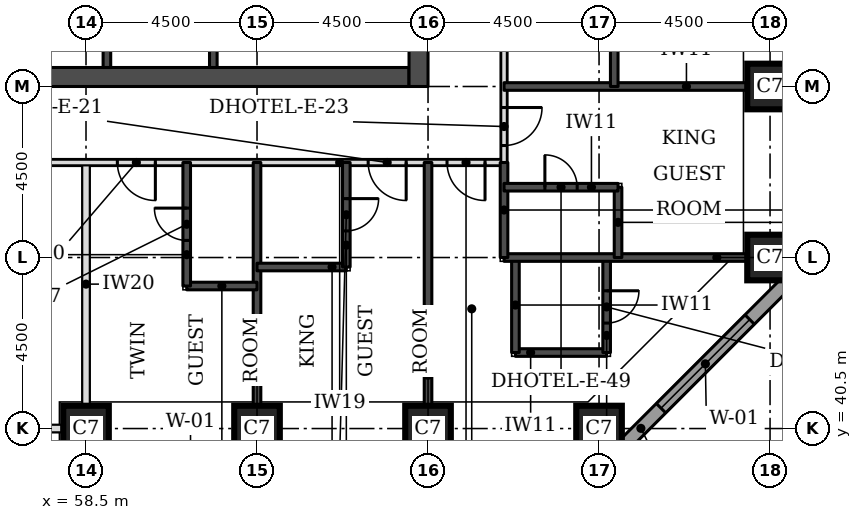
"""IFC4 building model, lengths in metres.
Left out: names, types, materials, properties, quantities, classifications, styles, units other than length and angle.
Written with IfcOpenShell. Run it as: python <this file> out.ifc"""

import sys

from ifc_helpers import new_model, si_unit, direction, frame, frame_2d, origin, origin_2d, place, context, subcontext, project, spatial, rectangle, extrude, element, fill, save


model = new_model("IFC4")
c1 = context("Model", 3, precision=1e-05, world=origin(), true_north=direction((0.0, 1.0)))
c2 = subcontext(c1, "Body", "Model", "MODEL_VIEW")
j1 = project(units=[si_unit("LENGTHUNIT", "METRE"), si_unit("PLANEANGLEUNIT", "RADIAN")], contexts=[c1])
p1 = place(None, origin())
s1 = spatial("IfcSite", under=j1, at=p1, CompositionType="ELEMENT")
p2 = place(p1, origin())
s2 = spatial("IfcBuilding", under=s1, at=p2, CompositionType="ELEMENT")
p3 = place(p2, frame((0.0, 0.0, 39.6)))
s3 = spatial("IfcBuildingStorey", under=s2, at=p3, CompositionType="ELEMENT", Elevation=39.6)
for number, where, z_axis, x_axis in (
    (1, (58.5, 40.5, 0.0), (0.0, 0.0, 1.0), (1.0, 0.0, 0.0)),
    (2, (63.0, 40.5, 0.0), (0.0, 0.0, 1.0), (1.0, 0.0, 0.0)),
    (3, (67.5, 40.5, 0.0), (0.0, 0.0, 1.0), (1.0, 0.0, 0.0)),
    (4, (72.0, 40.5, 0.0), (0.0, 0.0, 1.0), (1.0, 0.0, 0.0)),
    (5, (76.5, 45.0, 0.0), (0.0, 0.0, 1.0), (1.0, 0.0, 0.0)),
    (6, (76.5, 49.5, 0.0), (0.0, 0.0, 1.0), (1.0, 0.0, 0.0)),
):
    element("IfcColumn", number, at=place(p3, frame(where, z_axis=z_axis, x_axis=x_axis)), inside=s3, PredefinedType="COLUMN", context=c2, shape_type="SweptSolid", body=[
        extrude(rectangle(XDim=1.2, YDim=1.2, at=origin_2d()), origin(), (0.0, 0.0, 1.0), 3.3),
    ])
p4 = place(p3, frame((45.5, 49.75, 0.0), z_axis=(0.0, 0.0, 1.0), x_axis=(1.0, 0.0, 0.0)))
e7 = element("IfcWall", 7, at=p4, inside=s3, PredefinedType="SHEAR", context=c2, shape_type="SweptSolid", body=[
    extrude(rectangle(XDim=21.5, YDim=0.5, at=frame_2d((10.75, 0.0))), origin(), (0.0, 0.0, 1.0), 3.3),
])
p5 = place(p3, frame((67.25, 49.5, 0.0), z_axis=(0.0, 0.0, 1.0), x_axis=(0.0, 1.0, 0.0)))
e8 = element("IfcWall", 8, at=p5, inside=s3, PredefinedType="SHEAR", context=c2, shape_type="SweptSolid", body=[
    extrude(rectangle(XDim=22.5, YDim=0.5, at=frame_2d((11.25, 0.0))), origin(), (0.0, 0.0, 1.0), 3.3),
])
p6 = place(p5, frame((4.2, 0.0, 0.0)))
e9 = element("IfcOpeningElement", 9, at=p6, cuts=e8, PredefinedType="OPENING", context=c2, shape_type="SweptSolid", body=[
    extrude(rectangle(XDim=1.8, YDim=2.1, at=frame_2d((0.9, 1.05))), frame((0.0, 0.26, 0.0), z_axis=(0.0, -1.0, 0.0), x_axis=(1.0, 0.0, 0.0)), (0.0, 0.0, 1.0), 0.52),
])
p7 = place(p5, frame((6.9, 0.0, 0.0)))
e10 = element("IfcOpeningElement", 10, at=p7, cuts=e8, PredefinedType="OPENING", context=c2, shape_type="SweptSolid", body=[
    extrude(rectangle(XDim=1.1, YDim=2.1, at=frame_2d((0.55, 1.05))), frame((0.0, 0.26, 0.0), z_axis=(0.0, -1.0, 0.0), x_axis=(1.0, 0.0, 0.0)), (0.0, 0.0, 1.0), 0.52),
])
p8 = place(p5, frame((13.6, 0.0, 0.0)))
e11 = element("IfcOpeningElement", 11, at=p8, cuts=e8, PredefinedType="OPENING", context=c2, shape_type="SweptSolid", body=[
    extrude(rectangle(XDim=1.1, YDim=2.1, at=frame_2d((0.55, 1.05))), frame((0.0, 0.26, 0.0), z_axis=(0.0, -1.0, 0.0), x_axis=(1.0, 0.0, 0.0)), (0.0, 0.0, 1.0), 0.52),
])
p9 = place(p5, frame((16.5, 0.0, 0.0)))
e12 = element("IfcOpeningElement", 12, at=p9, cuts=e8, PredefinedType="OPENING", context=c2, shape_type="SweptSolid", body=[
    extrude(rectangle(XDim=1.8, YDim=2.1, at=frame_2d((0.9, 1.05))), frame((0.0, 0.26, 0.0), z_axis=(0.0, -1.0, 0.0), x_axis=(1.0, 0.0, 0.0)), (0.0, 0.0, 1.0), 0.52),
])
p10 = place(p3, frame((72.27, 39.674, 0.0), z_axis=(0.0, 0.0, 1.0), x_axis=(0.707106781187, 0.707106781187, 0.0)))
e13 = element("IfcWall", 13, at=p10, inside=s3, PredefinedType="STANDARD", context=c2, shape_type="SweptSolid", body=[
    extrude(rectangle(XDim=7.151, YDim=0.35, at=frame_2d((3.576, 0.0))), origin(), (0.0, 0.0, 1.0), 3.055),
])
p11 = place(p10, frame((1.926, 0.0, 0.8)))
e14 = element("IfcOpeningElement", 14, at=p11, cuts=e13, PredefinedType="OPENING", context=c2, shape_type="SweptSolid", body=[
    extrude(rectangle(XDim=3.3, YDim=1.5, at=frame_2d((1.65, 0.75))), frame((0.0, 0.185, 0.0), z_axis=(0.0, -1.0, 0.0), x_axis=(1.0, 0.0, 0.0)), (0.0, 0.0, 1.0), 0.37),
])
p12 = place(p3, frame((52.85, 40.5, 0.0), z_axis=(0.0, 0.0, 1.0), x_axis=(1.0, 0.0, 0.0)))
e15 = element("IfcWall", 15, at=p12, inside=s3, PredefinedType="PARTITIONING", context=c2, shape_type="SweptSolid", body=[
    extrude(rectangle(XDim=5.05, YDim=0.2, at=frame_2d((2.525, 0.0))), origin(), (0.0, 0.0, 1.0), 2.33),
])
p13 = place(p3, frame((58.5, 41.1, 0.0), z_axis=(0.0, 0.0, 1.0), x_axis=(0.0, 1.0, 0.0)))
e16 = element("IfcWall", 16, at=p13, inside=s3, PredefinedType="PARTITIONING", context=c2, shape_type="SweptSolid", body=[
    extrude(rectangle(XDim=6.4, YDim=0.2, at=frame_2d((3.2, 0.0))), origin(), (0.0, 0.0, 1.0), 3.08),
])
p14 = place(p3, frame((52.85, 47.5, 0.0), z_axis=(0.0, 0.0, 1.0), x_axis=(1.0, 0.0, 0.0)))
e17 = element("IfcWall", 17, at=p14, inside=s3, PredefinedType="PARTITIONING", context=c2, shape_type="SweptSolid", body=[
    extrude(rectangle(XDim=16.65, YDim=0.15, at=frame_2d((8.325, 0.0))), origin(), (0.0, 0.0, 1.0), 3.08),
])
p15 = place(p14, frame((13.075, 0.0, 0.0)))
e18 = element("IfcOpeningElement", 18, at=p15, cuts=e17, PredefinedType="OPENING", context=c2, shape_type="SweptSolid", body=[
    extrude(rectangle(XDim=1.0, YDim=2.1, at=frame_2d((0.5, 1.05))), frame((0.0, 0.085, 0.0), z_axis=(0.0, -1.0, 0.0), x_axis=(1.0, 0.0, 0.0)), (0.0, 0.0, 1.0), 0.17),
])
p16 = place(p14, frame((6.475, 0.0, 0.0)))
e19 = element("IfcOpeningElement", 19, at=p16, cuts=e17, PredefinedType="OPENING", context=c2, shape_type="SweptSolid", body=[
    extrude(rectangle(XDim=1.0, YDim=2.1, at=frame_2d((0.5, 1.05))), frame((0.0, 0.085, 0.0), z_axis=(0.0, -1.0, 0.0), x_axis=(1.0, 0.0, 0.0)), (0.0, 0.0, 1.0), 0.17),
])
p17 = place(p14, frame((15.15, 0.0, 0.0)))
e20 = element("IfcOpeningElement", 20, at=p17, cuts=e17, PredefinedType="OPENING", context=c2, shape_type="SweptSolid", body=[
    extrude(rectangle(XDim=1.0, YDim=2.1, at=frame_2d((0.5, 1.05))), frame((0.0, 0.085, 0.0), z_axis=(0.0, -1.0, 0.0), x_axis=(1.0, 0.0, 0.0)), (0.0, 0.0, 1.0), 0.17),
])
p18 = place(p3, frame((69.5, 47.5, 0.0), z_axis=(0.0, 0.0, 1.0), x_axis=(0.0, 1.0, 0.0)))
e21 = element("IfcWall", 21, at=p18, inside=s3, PredefinedType="PARTITIONING", context=c2, shape_type="SweptSolid", body=[
    extrude(rectangle(XDim=26.5, YDim=0.15, at=frame_2d((13.25, 0.0))), origin(), (0.0, 0.0, 1.0), 3.08),
])
p19 = place(p18, frame((25.053, 0.0, 0.0)))
e22 = element("IfcOpeningElement", 22, at=p19, cuts=e21, PredefinedType="OPENING", context=c2, shape_type="SweptSolid", body=[
    extrude(rectangle(XDim=1.0, YDim=2.1, at=frame_2d((0.5, 1.05))), frame((0.0, 0.085, 0.0), z_axis=(0.0, -1.0, 0.0), x_axis=(1.0, 0.0, 0.0)), (0.0, 0.0, 1.0), 0.17),
])
p20 = place(p18, frame((13.775, 0.0, 0.0)))
e23 = element("IfcOpeningElement", 23, at=p20, cuts=e21, PredefinedType="OPENING", context=c2, shape_type="SweptSolid", body=[
    extrude(rectangle(XDim=1.0, YDim=2.1, at=frame_2d((0.5, 1.05))), frame((0.0, 0.085, 0.0), z_axis=(0.0, -1.0, 0.0), x_axis=(1.0, 0.0, 0.0)), (0.0, 0.0, 1.0), 0.17),
])
p21 = place(p18, frame((7.65, 0.0, 0.0)))
e24 = element("IfcOpeningElement", 24, at=p21, cuts=e21, PredefinedType="OPENING", context=c2, shape_type="SweptSolid", body=[
    extrude(rectangle(XDim=1.1, YDim=2.1, at=frame_2d((0.55, 1.05))), frame((0.0, 0.085, 0.0), z_axis=(0.0, -1.0, 0.0), x_axis=(1.0, 0.0, 0.0)), (0.0, 0.0, 1.0), 0.17),
])
p22 = place(p18, frame((0.447, 0.0, 0.0)))
e25 = element("IfcOpeningElement", 25, at=p22, cuts=e21, PredefinedType="OPENING", context=c2, shape_type="SweptSolid", body=[
    extrude(rectangle(XDim=1.0, YDim=2.1, at=frame_2d((0.5, 1.05))), frame((0.0, 0.085, 0.0), z_axis=(0.0, -1.0, 0.0), x_axis=(1.0, 0.0, 0.0)), (0.0, 0.0, 1.0), 0.17),
])
for number, where, z_axis, x_axis in (
    (26, (63.0, 41.1, 0.0), (0.0, 0.0, 1.0), (0.0, 1.0, 0.0)),
    (27, (67.5, 41.1, 0.0), (0.0, 0.0, 1.0), (0.0, 1.0, 0.0)),
):
    element("IfcWall", number, at=place(p3, frame(where, z_axis=z_axis, x_axis=x_axis)), inside=s3, PredefinedType="SOLIDWALL", context=c2, shape_type="SweptSolid", body=[
        extrude(rectangle(XDim=6.4, YDim=0.2, at=frame_2d((3.2, 0.0))), origin(), (0.0, 0.0, 1.0), 3.08),
    ])
p23 = place(p3, frame((69.8, 42.5, 0.0), z_axis=(0.0, 0.0, 1.0), x_axis=(1.0, 0.0, 0.0)))
e28 = element("IfcWall", 28, at=p23, inside=s3, PredefinedType="SOLIDWALL", context=c2, shape_type="SweptSolid", body=[
    extrude(rectangle(XDim=2.4, YDim=0.2, at=frame_2d((1.2, 0.0))), origin(), (0.0, 0.0, 1.0), 3.08),
])
p24 = place(p3, frame((69.8, 42.5, 0.0), z_axis=(0.0, 0.0, 1.0), x_axis=(0.0, 1.0, 0.0)))
e29 = element("IfcWall", 29, at=p24, inside=s3, PredefinedType="SOLIDWALL", context=c2, shape_type="SweptSolid", body=[
    extrude(rectangle(XDim=2.5, YDim=0.2, at=frame_2d((1.25, 0.0))), origin(), (0.0, 0.0, 1.0), 3.08),
])
p25 = place(p3, frame((72.2, 42.5, 0.0), z_axis=(0.0, 0.0, 1.0), x_axis=(0.0, 1.0, 0.0)))
e30 = element("IfcWall", 30, at=p25, inside=s3, PredefinedType="SOLIDWALL", context=c2, shape_type="SweptSolid", body=[
    extrude(rectangle(XDim=2.5, YDim=0.2, at=frame_2d((1.25, 0.0))), origin(), (0.0, 0.0, 1.0), 3.08),
])
p26 = place(p25, frame((0.775, 0.0, 0.0)))
e31 = element("IfcOpeningElement", 31, at=p26, cuts=e30, PredefinedType="OPENING", context=c2, shape_type="SweptSolid", body=[
    extrude(rectangle(XDim=0.85, YDim=2.1, at=frame_2d((0.425, 1.05))), frame((0.0, 0.11, 0.0), z_axis=(0.0, -1.0, 0.0), x_axis=(1.0, 0.0, 0.0)), (0.0, 0.0, 1.0), 0.22),
])
p27 = place(p3, frame((61.15, 44.25, 0.0), z_axis=(0.0, 0.0, 1.0), x_axis=(1.0, 0.0, 0.0)))
e32 = element("IfcWall", 32, at=p27, inside=s3, PredefinedType="SOLIDWALL", context=c2, shape_type="SweptSolid", body=[
    extrude(rectangle(XDim=1.85, YDim=0.2, at=frame_2d((0.925, 0.0))), origin(), (0.0, 0.0, 1.0), 3.08),
])
p28 = place(p3, frame((61.15, 44.25, 0.0), z_axis=(0.0, 0.0, 1.0), x_axis=(0.0, 1.0, 0.0)))
e33 = element("IfcWall", 33, at=p28, inside=s3, PredefinedType="SOLIDWALL", context=c2, shape_type="SweptSolid", body=[
    extrude(rectangle(XDim=3.25, YDim=0.2, at=frame_2d((1.625, 0.0))), origin(), (0.0, 0.0, 1.0), 3.08),
])
p29 = place(p28, frame((1.2, 0.0, 0.0)))
e34 = element("IfcOpeningElement", 34, at=p29, cuts=e33, PredefinedType="OPENING", context=c2, shape_type="SweptSolid", body=[
    extrude(rectangle(XDim=0.85, YDim=2.1, at=frame_2d((0.425, 1.05))), frame((0.0, 0.11, 0.0), z_axis=(0.0, -1.0, 0.0), x_axis=(1.0, 0.0, 0.0)), (0.0, 0.0, 1.0), 0.22),
])
p30 = place(p3, frame((63.0, 44.75, 0.0), z_axis=(0.0, 0.0, 1.0), x_axis=(1.0, 0.0, 0.0)))
e35 = element("IfcWall", 35, at=p30, inside=s3, PredefinedType="SOLIDWALL", context=c2, shape_type="SweptSolid", body=[
    extrude(rectangle(XDim=2.35, YDim=0.2, at=frame_2d((1.175, 0.0))), origin(), (0.0, 0.0, 1.0), 3.08),
])
p31 = place(p3, frame((65.35, 44.75, 0.0), z_axis=(0.0, 0.0, 1.0), x_axis=(0.0, 1.0, 0.0)))
e36 = element("IfcWall", 36, at=p31, inside=s3, PredefinedType="SOLIDWALL", context=c2, shape_type="SweptSolid", body=[
    extrude(rectangle(XDim=2.75, YDim=0.2, at=frame_2d((1.375, 0.0))), origin(), (0.0, 0.0, 1.0), 3.08),
])
p32 = place(p31, frame((0.95, 0.0, 0.0)))
e37 = element("IfcOpeningElement", 37, at=p32, cuts=e36, PredefinedType="OPENING", context=c2, shape_type="SweptSolid", body=[
    extrude(rectangle(XDim=0.85, YDim=2.1, at=frame_2d((0.425, 1.05))), frame((0.0, 0.11, 0.0), z_axis=(0.0, -1.0, 0.0), x_axis=(1.0, 0.0, 0.0)), (0.0, 0.0, 1.0), 0.22),
])
p33 = place(p3, frame((69.5, 45.0, 0.0), z_axis=(0.0, 0.0, 1.0), x_axis=(1.0, 0.0, 0.0)))
e38 = element("IfcWall", 38, at=p33, inside=s3, PredefinedType="SOLIDWALL", context=c2, shape_type="SweptSolid", body=[
    extrude(rectangle(XDim=6.4, YDim=0.2, at=frame_2d((3.2, 0.0))), origin(), (0.0, 0.0, 1.0), 3.08),
])
p34 = place(p3, frame((69.5, 45.0, 0.0), z_axis=(0.0, 0.0, 1.0), x_axis=(0.0, 1.0, 0.0)))
e39 = element("IfcWall", 39, at=p34, inside=s3, PredefinedType="SOLIDWALL", context=c2, shape_type="SweptSolid", body=[
    extrude(rectangle(XDim=2.5, YDim=0.2, at=frame_2d((1.25, 0.0))), origin(), (0.0, 0.0, 1.0), 3.08),
])
p35 = place(p3, frame((72.5, 45.0, 0.0), z_axis=(0.0, 0.0, 1.0), x_axis=(0.0, 1.0, 0.0)))
e40 = element("IfcWall", 40, at=p35, inside=s3, PredefinedType="SOLIDWALL", context=c2, shape_type="SweptSolid", body=[
    extrude(rectangle(XDim=1.85, YDim=0.2, at=frame_2d((0.925, 0.0))), origin(), (0.0, 0.0, 1.0), 3.08),
])
p36 = place(p3, frame((69.5, 46.85, 0.0), z_axis=(0.0, 0.0, 1.0), x_axis=(1.0, 0.0, 0.0)))
e41 = element("IfcWall", 41, at=p36, inside=s3, PredefinedType="SOLIDWALL", context=c2, shape_type="SweptSolid", body=[
    extrude(rectangle(XDim=3.0, YDim=0.2, at=frame_2d((1.5, 0.0))), origin(), (0.0, 0.0, 1.0), 3.08),
])
p37 = place(p36, frame((1.075, 0.0, 0.0)))
e42 = element("IfcOpeningElement", 42, at=p37, cuts=e41, PredefinedType="OPENING", context=c2, shape_type="SweptSolid", body=[
    extrude(rectangle(XDim=0.85, YDim=2.1, at=frame_2d((0.425, 1.05))), frame((0.0, 0.11, 0.0), z_axis=(0.0, -1.0, 0.0), x_axis=(1.0, 0.0, 0.0)), (0.0, 0.0, 1.0), 0.22),
])
p38 = place(p3, frame((69.5, 49.5, 0.0), z_axis=(0.0, 0.0, 1.0), x_axis=(1.0, 0.0, 0.0)))
e43 = element("IfcWall", 43, at=p38, inside=s3, PredefinedType="SOLIDWALL", context=c2, shape_type="SweptSolid", body=[
    extrude(rectangle(XDim=6.4, YDim=0.2, at=frame_2d((3.2, 0.0))), origin(), (0.0, 0.0, 1.0), 3.08),
])
p39 = place(p3, frame((72.4, 49.5, 0.0), z_axis=(0.0, 0.0, 1.0), x_axis=(0.0, 1.0, 0.0)))
e44 = element("IfcWall", 44, at=p39, inside=s3, PredefinedType="SOLIDWALL", context=c2, shape_type="SweptSolid", body=[
    extrude(rectangle(XDim=3.4, YDim=0.2, at=frame_2d((1.7, 0.0))), origin(), (0.0, 0.0, 1.0), 3.08),
])
for number, where, z_axis, x_axis in (
    (45, (59.05, 50.0, 0.0), (0.0, 0.0, 1.0), (0.0, 1.0, 0.0)),
    (46, (61.85, 50.0, 0.0), (0.0, 0.0, 1.0), (0.0, 1.0, 0.0)),
):
    element("IfcWall", number, at=place(p3, frame(where, z_axis=z_axis, x_axis=x_axis)), inside=s3, PredefinedType="SOLIDWALL", context=c2, shape_type="SweptSolid", body=[
        extrude(rectangle(XDim=3.0, YDim=0.2, at=frame_2d((1.5, 0.0))), origin(), (0.0, 0.0, 1.0), 3.08),
    ])
p40 = place(p11, origin())
e47 = element("IfcWindow", 47, at=p40, inside=s3, PartitioningType="SINGLE_PANEL", PredefinedType="WINDOW", context=c2, shape_type="SweptSolid", body=[
    extrude(rectangle(XDim=3.3, YDim=1.5, at=frame_2d((1.65, 0.75))), frame((0.0, 0.085, 0.0), z_axis=(0.0, -1.0, 0.0), x_axis=(1.0, 0.0, 0.0)), (0.0, 0.0, 1.0), 0.06),
])
fill(e14, e47)
p41 = place(p22, frame((1.0, 0.0, 0.0), z_axis=(0.0, 0.0, 1.0), x_axis=(-1.0, 0.0, 0.0)))
e48 = element("IfcDoor", 48, at=p41, inside=s3, OperationType="SINGLE_SWING_LEFT", PredefinedType="DOOR", context=c2, shape_type="SweptSolid", body=[
    extrude(rectangle(XDim=1.0, YDim=2.1, at=frame_2d((0.5, 1.05))), frame((0.0, 0.025, 0.0), z_axis=(0.0, -1.0, 0.0), x_axis=(1.0, 0.0, 0.0)), (0.0, 0.0, 1.0), 0.05),
])
fill(e25, e48)
p42 = place(p37, origin())
e49 = element("IfcDoor", 49, at=p42, inside=s3, OperationType="SINGLE_SWING_LEFT", PredefinedType="DOOR", context=c2, shape_type="SweptSolid", body=[
    extrude(rectangle(XDim=0.85, YDim=2.1, at=frame_2d((0.425, 1.05))), frame((0.0, 0.025, 0.0), z_axis=(0.0, -1.0, 0.0), x_axis=(1.0, 0.0, 0.0)), (0.0, 0.0, 1.0), 0.05),
])
fill(e42, e49)
p43 = place(p15, frame((1.0, 0.0, 0.0), z_axis=(0.0, 0.0, 1.0), x_axis=(-1.0, 0.0, 0.0)))
e50 = element("IfcDoor", 50, at=p43, inside=s3, OperationType="SINGLE_SWING_LEFT", PredefinedType="DOOR", context=c2, shape_type="SweptSolid", body=[
    extrude(rectangle(XDim=1.0, YDim=2.1, at=frame_2d((0.5, 1.05))), frame((0.0, 0.025, 0.0), z_axis=(0.0, -1.0, 0.0), x_axis=(1.0, 0.0, 0.0)), (0.0, 0.0, 1.0), 0.05),
])
fill(e18, e50)
p44 = place(p32, frame((0.85, 0.0, 0.0), z_axis=(0.0, 0.0, 1.0), x_axis=(-1.0, 0.0, 0.0)))
e51 = element("IfcDoor", 51, at=p44, inside=s3, OperationType="SINGLE_SWING_LEFT", PredefinedType="DOOR", context=c2, shape_type="SweptSolid", body=[
    extrude(rectangle(XDim=0.85, YDim=2.1, at=frame_2d((0.425, 1.05))), frame((0.0, 0.025, 0.0), z_axis=(0.0, -1.0, 0.0), x_axis=(1.0, 0.0, 0.0)), (0.0, 0.0, 1.0), 0.05),
])
fill(e37, e51)
p45 = place(p16, frame((1.0, 0.0, 0.0), z_axis=(0.0, 0.0, 1.0), x_axis=(-1.0, 0.0, 0.0)))
e52 = element("IfcDoor", 52, at=p45, inside=s3, OperationType="SINGLE_SWING_LEFT", PredefinedType="DOOR", context=c2, shape_type="SweptSolid", body=[
    extrude(rectangle(XDim=1.0, YDim=2.1, at=frame_2d((0.5, 1.05))), frame((0.0, 0.025, 0.0), z_axis=(0.0, -1.0, 0.0), x_axis=(1.0, 0.0, 0.0)), (0.0, 0.0, 1.0), 0.05),
])
fill(e19, e52)
p46 = place(p29, origin())
e53 = element("IfcDoor", 53, at=p46, inside=s3, OperationType="SINGLE_SWING_RIGHT", PredefinedType="DOOR", context=c2, shape_type="SweptSolid", body=[
    extrude(rectangle(XDim=0.85, YDim=2.1, at=frame_2d((0.425, 1.05))), frame((0.0, 0.025, 0.0), z_axis=(0.0, -1.0, 0.0), x_axis=(1.0, 0.0, 0.0)), (0.0, 0.0, 1.0), 0.05),
])
fill(e34, e53)
p47 = place(p17, frame((1.0, 0.0, 0.0), z_axis=(0.0, 0.0, 1.0), x_axis=(-1.0, 0.0, 0.0)))
e54 = element("IfcDoor", 54, at=p47, inside=s3, OperationType="SINGLE_SWING_LEFT", PredefinedType="DOOR", context=c2, shape_type="SweptSolid", body=[
    extrude(rectangle(XDim=1.0, YDim=2.1, at=frame_2d((0.5, 1.05))), frame((0.0, 0.025, 0.0), z_axis=(0.0, -1.0, 0.0), x_axis=(1.0, 0.0, 0.0)), (0.0, 0.0, 1.0), 0.05),
])
fill(e20, e54)
p48 = place(p26, frame((0.85, 0.0, 0.0), z_axis=(0.0, 0.0, 1.0), x_axis=(-1.0, 0.0, 0.0)))
e55 = element("IfcDoor", 55, at=p48, inside=s3, OperationType="SINGLE_SWING_LEFT", PredefinedType="DOOR", context=c2, shape_type="SweptSolid", body=[
    extrude(rectangle(XDim=0.85, YDim=2.1, at=frame_2d((0.425, 1.05))), frame((0.0, 0.025, 0.0), z_axis=(0.0, -1.0, 0.0), x_axis=(1.0, 0.0, 0.0)), (0.0, 0.0, 1.0), 0.05),
])
fill(e31, e55)
save(model, sys.argv[1])
